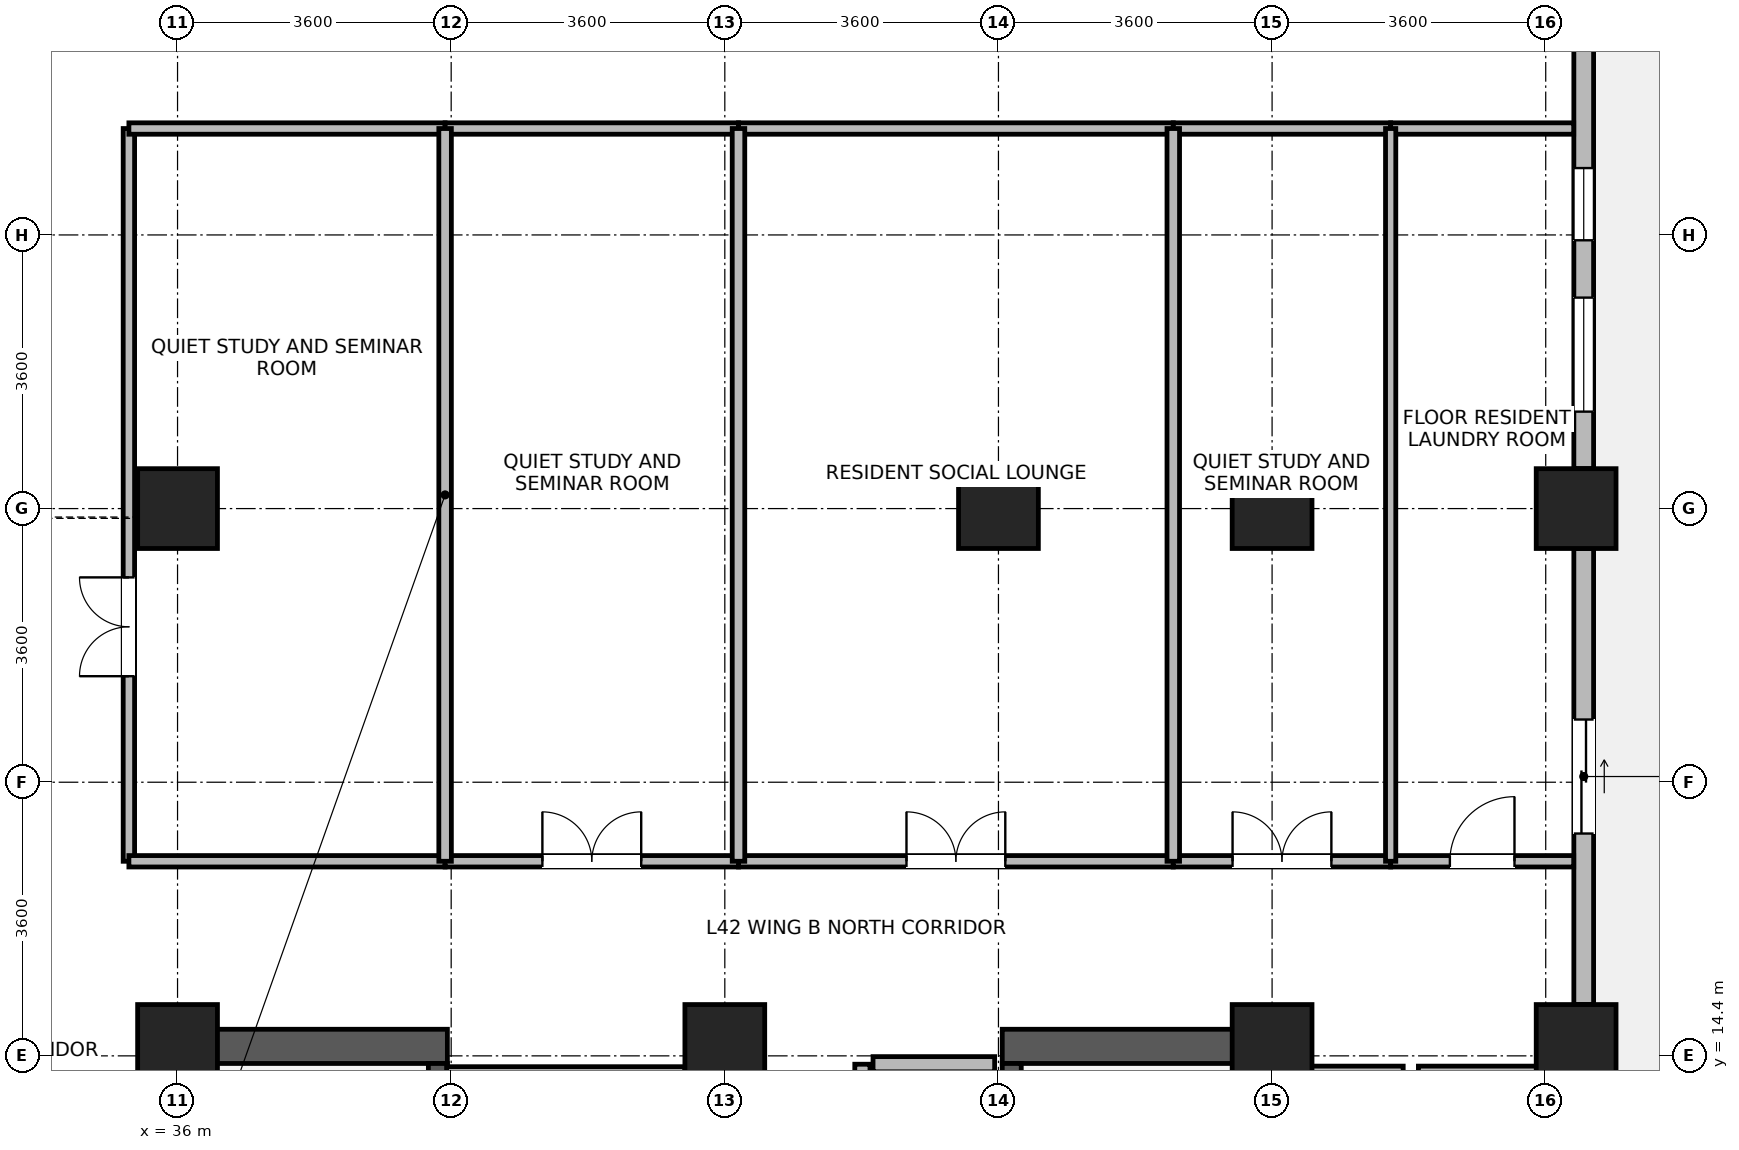
"""IFC4 building model, lengths in metres.
Left out: names, types, materials, properties, quantities, classifications, styles, units other than length and angle.
Written with IfcOpenShell. Run it as: python <this file> out.ifc"""

import sys

from ifc_helpers import new_model, si_unit, direction, frame, frame_2d, origin, origin_2d, place, context, subcontext, project, spatial, rectangle, extrude, source, transform, mapped, element, fill, save


model = new_model("IFC4")
c1 = context("Model", 3, precision=1e-05, world=origin(), true_north=direction((0.0, 1.0)))
c2 = subcontext(c1, "Body", "Model", "MODEL_VIEW")
j1 = project(units=[si_unit("LENGTHUNIT", "METRE"), si_unit("PLANEANGLEUNIT", "RADIAN")], contexts=[c1])
p1 = place(None, origin())
s1 = spatial("IfcSite", under=j1, at=p1, CompositionType="ELEMENT")
p2 = place(p1, origin())
s2 = spatial("IfcBuilding", under=s1, at=p2, CompositionType="ELEMENT")
p3 = place(p2, frame((0.0, 0.0, 166.1)))
s3 = spatial("IfcBuildingStorey", under=s2, at=p3, CompositionType="ELEMENT", Elevation=166.1)
for number, where, z_axis, x_axis in (
    (1, (36.125, 6.85, 0.0), (0.0, 0.0, 1.0), (0.0, 1.0, 0.0)),
    (2, (50.275, 6.85, 0.0), (0.0, 0.0, 1.0), (0.0, 1.0, 0.0)),
):
    element("IfcWall", number, at=place(p3, frame(where, z_axis=z_axis, x_axis=x_axis)), inside=s3, PredefinedType="SHEAR", context=c2, shape_type="SweptSolid", body=[
        extrude(rectangle(XDim=7.9, YDim=0.45, at=frame_2d((3.95, 0.0))), origin(), (0.0, 0.0, 1.0), 3.46),
    ])
for number, where, z_axis, x_axis in (
    (3, (36.35, 14.525, 0.0), (0.0, 0.0, 1.0), (1.0, 0.0, 0.0)),
    (4, (46.85, 14.525, 0.0), (0.0, 0.0, 1.0), (1.0, 0.0, 0.0)),
):
    element("IfcWall", number, at=place(p3, frame(where, z_axis=z_axis, x_axis=x_axis)), inside=s3, PredefinedType="SHEAR", context=c2, shape_type="SweptSolid", body=[
        extrude(rectangle(XDim=3.2, YDim=0.45, at=frame_2d((1.6, 0.0))), origin(), (0.0, 0.0, 1.0), 3.46),
    ])
p4 = place(p3, frame((39.425, 7.3, 0.0), z_axis=(0.0, 0.0, 1.0), x_axis=(0.0, 1.0, 0.0)))
e5 = element("IfcWall", 5, at=p4, inside=s3, PredefinedType="SHEAR", context=c2, shape_type="SweptSolid", body=[
    extrude(rectangle(XDim=7.0, YDim=0.25, at=frame_2d((3.5, 0.0))), origin(), (0.0, 0.0, 1.0), 3.46),
])
p5 = place(p4, frame((0.15, 0.0, 0.0)))
e6 = element("IfcOpeningElement", 6, at=p5, cuts=e5, PredefinedType="OPENING", context=c2, shape_type="SweptSolid", body=[
    extrude(rectangle(XDim=1.1, YDim=2.08, at=frame_2d((0.55, 1.04))), frame((0.0, 0.135, 0.0), z_axis=(0.0, -1.0, 0.0), x_axis=(1.0, 0.0, 0.0)), (0.0, 0.0, 1.0), 0.27),
])
p6 = place(p3, frame((46.975, 7.3, 0.0), z_axis=(0.0, 0.0, 1.0), x_axis=(0.0, 1.0, 0.0)))
e7 = element("IfcWall", 7, at=p6, inside=s3, PredefinedType="SHEAR", context=c2, shape_type="SweptSolid", body=[
    extrude(rectangle(XDim=7.0, YDim=0.25, at=frame_2d((3.5, 0.0))), origin(), (0.0, 0.0, 1.0), 3.46),
])
p7 = place(p6, frame((0.15, 0.0, 0.0)))
e8 = element("IfcOpeningElement", 8, at=p7, cuts=e7, PredefinedType="OPENING", context=c2, shape_type="SweptSolid", body=[
    extrude(rectangle(XDim=1.1, YDim=2.08, at=frame_2d((0.55, 1.04))), frame((0.0, 0.135, 0.0), z_axis=(0.0, -1.0, 0.0), x_axis=(1.0, 0.0, 0.0)), (0.0, 0.0, 1.0), 0.27),
])
m1 = source(origin(), c2, "Body", "SweptSolid", [
    extrude(rectangle(XDim=1.05, YDim=1.05, at=origin_2d()), origin(), (0.0, 0.0, 1.0), 3.7),
])
for number, where, z_axis, x_axis in (
    (9, (36.0, 21.6, 0.0), (0.0, 0.0, 1.0), (1.0, 0.0, 0.0)),
    (10, (46.8, 21.6, 0.0), (0.0, 0.0, 1.0), (1.0, 0.0, 0.0)),
    (11, (36.0, 14.55, 0.0), (0.0, 0.0, 1.0), (1.0, 0.0, 0.0)),
    (12, (43.2, 14.55, 0.0), (0.0, 0.0, 1.0), (1.0, 0.0, 0.0)),
    (13, (50.4, 14.55, 0.0), (0.0, 0.0, 1.0), (1.0, 0.0, 0.0)),
    (14, (50.4, 21.6, 0.0), (0.0, 0.0, 1.0), (1.0, 0.0, 0.0)),
    (15, (54.4, 14.55, 0.0), (0.0, 0.0, 1.0), (1.0, 0.0, 0.0)),
    (16, (54.4, 21.6, 0.0), (0.0, 0.0, 1.0), (1.0, 0.0, 0.0)),
):
    element("IfcColumn", number, at=place(p3, frame(where, z_axis=z_axis, x_axis=x_axis)), inside=s3, PredefinedType="COLUMN", context=c2, shape_type="MappedRepresentation", body=[
        mapped(m1, transform((0.0, 0.0, 0.0), x_axis=(1.0, 0.0, 0.0), y_axis=(0.0, 1.0, 0.0), z_axis=(0.0, 0.0, 1.0), scale=1.0)),
    ])
p8 = place(p3, frame((54.5, 21.074, 0.0), z_axis=(0.0, 0.0, 1.0), x_axis=(0.0, -1.0, 0.0)))
e17 = element("IfcWall", 17, at=p8, inside=s3, PredefinedType="STANDARD", context=c2, shape_type="SweptSolid", body=[
    extrude(rectangle(XDim=5.998, YDim=0.26, at=frame_2d((2.999, 0.0))), origin(), (0.0, 0.0, 1.0), 2.99),
])
p9 = place(p8, frame((2.249, 0.0, 0.0)))
e18 = element("IfcOpeningElement", 18, at=p9, cuts=e17, PredefinedType="OPENING", context=c2, shape_type="SweptSolid", body=[
    extrude(rectangle(XDim=1.5, YDim=2.15, at=frame_2d((0.75, 1.075))), frame((0.0, 0.14, 0.0), z_axis=(0.0, -1.0, 0.0), x_axis=(1.0, 0.0, 0.0)), (0.0, 0.0, 1.0), 0.28),
])
p10 = place(p3, frame((54.5, 28.124, 0.0), z_axis=(0.0, 0.0, 1.0), x_axis=(0.0, -1.0, 0.0)))
e19 = element("IfcWall", 19, at=p10, inside=s3, PredefinedType="STANDARD", context=c2, shape_type="SweptSolid", body=[
    extrude(rectangle(XDim=5.998, YDim=0.26, at=frame_2d((2.999, 0.0))), origin(), (0.0, 0.0, 1.0), 2.99),
])
p11 = place(p10, frame((3.749, 0.0, 0.85)))
e20 = element("IfcOpeningElement", 20, at=p11, cuts=e19, PredefinedType="OPENING", context=c2, shape_type="SweptSolid", body=[
    extrude(rectangle(XDim=1.5, YDim=1.85, at=frame_2d((0.75, 0.925))), frame((0.0, 0.14, 0.0), z_axis=(0.0, -1.0, 0.0), x_axis=(1.0, 0.0, 0.0)), (0.0, 0.0, 1.0), 0.28),
])
p12 = place(p10, frame((2.044, 0.0, 0.85)))
e21 = element("IfcOpeningElement", 21, at=p12, cuts=e19, PredefinedType="OPENING", context=c2, shape_type="SweptSolid", body=[
    extrude(rectangle(XDim=0.95, YDim=1.75, at=frame_2d((0.475, 0.875))), frame((0.0, 0.14, 0.0), z_axis=(0.0, -1.0, 0.0), x_axis=(1.0, 0.0, 0.0)), (0.0, 0.0, 1.0), 0.28),
])
p13 = place(p3, frame((50.475, 14.165, 0.0), z_axis=(0.0, 0.0, 1.0), x_axis=(1.0, 0.0, 0.0)))
e22 = element("IfcWall", 22, at=p13, inside=s3, PredefinedType="PARTITIONING", context=c2, shape_type="SweptSolid", body=[
    extrude(rectangle(XDim=1.65, YDim=0.2, at=frame_2d((0.825, 0.0))), origin(), (0.0, 0.0, 1.0), 3.44),
])
p14 = place(p3, frame((52.325, 14.165, 0.0), z_axis=(0.0, 0.0, 1.0), x_axis=(1.0, 0.0, 0.0)))
e23 = element("IfcWall", 23, at=p14, inside=s3, PredefinedType="PARTITIONING", context=c2, shape_type="SweptSolid", body=[
    extrude(rectangle(XDim=1.65, YDim=0.2, at=frame_2d((0.825, 0.0))), origin(), (0.0, 0.0, 1.0), 3.44),
])
p15 = place(p3, frame((45.15, 14.29, 0.0), z_axis=(0.0, 0.0, 1.0), x_axis=(1.0, 0.0, 0.0)))
e24 = element("IfcWall", 24, at=p15, inside=s3, PredefinedType="PARTITIONING", context=c2, shape_type="SweptSolid", body=[
    extrude(rectangle(XDim=1.6, YDim=0.2, at=frame_2d((0.8, 0.0))), origin(), (0.0, 0.0, 1.0), 2.44),
])
p16 = place(p3, frame((45.01, 11.61, 0.0), z_axis=(0.0, 0.0, 1.0), x_axis=(0.0, 1.0, 0.0)))
e25 = element("IfcWall", 25, at=p16, inside=s3, PredefinedType="PARTITIONING", context=c2, shape_type="SweptSolid", body=[
    extrude(rectangle(XDim=2.68, YDim=0.2, at=frame_2d((1.34, 0.0))), origin(), (0.0, 0.0, 1.0), 3.44),
])
p17 = place(p3, frame((35.36, 16.96, 0.0), z_axis=(0.0, 0.0, 1.0), x_axis=(0.0, 1.0, 0.0)))
e26 = element("IfcWall", 26, at=p17, inside=s3, PredefinedType="PARTITIONING", context=c2, shape_type="SweptSolid", body=[
    extrude(rectangle(XDim=9.64, YDim=0.15, at=frame_2d((4.82, 0.0))), origin(), (0.0, 0.0, 1.0), 3.44),
])
p18 = place(p17, frame((2.435, 0.0, 0.0)))
e27 = element("IfcOpeningElement", 27, at=p18, cuts=e26, PredefinedType="OPENING", context=c2, shape_type="SweptSolid", body=[
    extrude(rectangle(XDim=1.3, YDim=2.12, at=frame_2d((0.65, 1.06))), frame((0.0, 0.085, 0.0), z_axis=(0.0, -1.0, 0.0), x_axis=(1.0, 0.0, 0.0)), (0.0, 0.0, 1.0), 0.17),
])
p19 = place(p3, frame((43.38, 16.96, 0.0), z_axis=(0.0, 0.0, 1.0), x_axis=(1.0, 0.0, 0.0)))
e28 = element("IfcWall", 28, at=p19, inside=s3, PredefinedType="PARTITIONING", context=c2, shape_type="SweptSolid", body=[
    extrude(rectangle(XDim=5.72, YDim=0.15, at=frame_2d((2.86, 0.0))), origin(), (0.0, 0.0, 1.0), 3.44),
])
p20 = place(p19, frame((2.21, 0.0, 0.0)))
e29 = element("IfcOpeningElement", 29, at=p20, cuts=e28, PredefinedType="OPENING", context=c2, shape_type="SweptSolid", body=[
    extrude(rectangle(XDim=1.3, YDim=2.12, at=frame_2d((0.65, 1.06))), frame((0.0, 0.085, 0.0), z_axis=(0.0, -1.0, 0.0), x_axis=(1.0, 0.0, 0.0)), (0.0, 0.0, 1.0), 0.17),
])
p21 = place(p3, frame((43.38, 26.6, 0.0), z_axis=(0.0, 0.0, 1.0), x_axis=(1.0, 0.0, 0.0)))
e30 = element("IfcWall", 30, at=p21, inside=s3, PredefinedType="PARTITIONING", context=c2, shape_type="SweptSolid", body=[
    extrude(rectangle(XDim=5.72, YDim=0.15, at=frame_2d((2.86, 0.0))), origin(), (0.0, 0.0, 1.0), 3.44),
])
for number, where, z_axis, x_axis in (
    (31, (35.36, 16.96, 0.0), (0.0, 0.0, 1.0), (1.0, 0.0, 0.0)),
    (32, (35.36, 26.6, 0.0), (0.0, 0.0, 1.0), (1.0, 0.0, 0.0)),
):
    element("IfcWall", number, at=place(p3, frame(where, z_axis=z_axis, x_axis=x_axis)), inside=s3, PredefinedType="PARTITIONING", context=c2, shape_type="SweptSolid", body=[
        extrude(rectangle(XDim=4.16, YDim=0.15, at=frame_2d((2.08, 0.0))), origin(), (0.0, 0.0, 1.0), 3.44),
    ])
p22 = place(p3, frame((39.52, 16.96, 0.0), z_axis=(0.0, 0.0, 1.0), x_axis=(1.0, 0.0, 0.0)))
e33 = element("IfcWall", 33, at=p22, inside=s3, PredefinedType="PARTITIONING", context=c2, shape_type="SweptSolid", body=[
    extrude(rectangle(XDim=3.86, YDim=0.15, at=frame_2d((1.93, 0.0))), origin(), (0.0, 0.0, 1.0), 3.44),
])
p23 = place(p22, frame((1.28, 0.0, 0.0)))
e34 = element("IfcOpeningElement", 34, at=p23, cuts=e33, PredefinedType="OPENING", context=c2, shape_type="SweptSolid", body=[
    extrude(rectangle(XDim=1.3, YDim=2.12, at=frame_2d((0.65, 1.06))), frame((0.0, 0.085, 0.0), z_axis=(0.0, -1.0, 0.0), x_axis=(1.0, 0.0, 0.0)), (0.0, 0.0, 1.0), 0.17),
])
p24 = place(p3, frame((39.52, 26.6, 0.0), z_axis=(0.0, 0.0, 1.0), x_axis=(1.0, 0.0, 0.0)))
e35 = element("IfcWall", 35, at=p24, inside=s3, PredefinedType="PARTITIONING", context=c2, shape_type="SweptSolid", body=[
    extrude(rectangle(XDim=3.86, YDim=0.15, at=frame_2d((1.93, 0.0))), origin(), (0.0, 0.0, 1.0), 3.44),
])
p25 = place(p3, frame((49.1, 16.96, 0.0), z_axis=(0.0, 0.0, 1.0), x_axis=(1.0, 0.0, 0.0)))
e36 = element("IfcWall", 36, at=p25, inside=s3, PredefinedType="PARTITIONING", context=c2, shape_type="SweptSolid", body=[
    extrude(rectangle(XDim=2.86, YDim=0.15, at=frame_2d((1.43, 0.0))), origin(), (0.0, 0.0, 1.0), 3.44),
])
p26 = place(p25, frame((0.78, 0.0, 0.0)))
e37 = element("IfcOpeningElement", 37, at=p26, cuts=e36, PredefinedType="OPENING", context=c2, shape_type="SweptSolid", body=[
    extrude(rectangle(XDim=1.3, YDim=2.12, at=frame_2d((0.65, 1.06))), frame((0.0, 0.085, 0.0), z_axis=(0.0, -1.0, 0.0), x_axis=(1.0, 0.0, 0.0)), (0.0, 0.0, 1.0), 0.17),
])
p27 = place(p3, frame((49.1, 26.6, 0.0), z_axis=(0.0, 0.0, 1.0), x_axis=(1.0, 0.0, 0.0)))
e38 = element("IfcWall", 38, at=p27, inside=s3, PredefinedType="PARTITIONING", context=c2, shape_type="SweptSolid", body=[
    extrude(rectangle(XDim=2.86, YDim=0.15, at=frame_2d((1.43, 0.0))), origin(), (0.0, 0.0, 1.0), 3.44),
])
p28 = place(p3, frame((51.96, 16.96, 0.0), z_axis=(0.0, 0.0, 1.0), x_axis=(1.0, 0.0, 0.0)))
e39 = element("IfcWall", 39, at=p28, inside=s3, PredefinedType="PARTITIONING", context=c2, shape_type="SweptSolid", body=[
    extrude(rectangle(XDim=2.408, YDim=0.15, at=frame_2d((1.204, 0.0))), origin(), (0.0, 0.0, 1.0), 3.44),
])
p29 = place(p28, frame((0.779, 0.0, 0.0)))
e40 = element("IfcOpeningElement", 40, at=p29, cuts=e39, PredefinedType="OPENING", context=c2, shape_type="SweptSolid", body=[
    extrude(rectangle(XDim=0.85, YDim=2.04, at=frame_2d((0.425, 1.02))), frame((0.0, 0.085, 0.0), z_axis=(0.0, -1.0, 0.0), x_axis=(1.0, 0.0, 0.0)), (0.0, 0.0, 1.0), 0.17),
])
p30 = place(p3, frame((51.96, 26.6, 0.0), z_axis=(0.0, 0.0, 1.0), x_axis=(1.0, 0.0, 0.0)))
e41 = element("IfcWall", 41, at=p30, inside=s3, PredefinedType="PARTITIONING", context=c2, shape_type="SweptSolid", body=[
    extrude(rectangle(XDim=2.408, YDim=0.15, at=frame_2d((1.204, 0.0))), origin(), (0.0, 0.0, 1.0), 3.44),
])
for number, where, z_axis, x_axis in (
    (42, (39.52, 16.96, 0.0), (0.0, 0.0, 1.0), (0.0, 1.0, 0.0)),
    (43, (43.38, 16.96, 0.0), (0.0, 0.0, 1.0), (0.0, 1.0, 0.0)),
    (44, (49.1, 16.96, 0.0), (0.0, 0.0, 1.0), (0.0, 1.0, 0.0)),
):
    element("IfcWall", number, at=place(p3, frame(where, z_axis=z_axis, x_axis=x_axis)), inside=s3, PredefinedType="PARTITIONING", context=c2, shape_type="SweptSolid", body=[
        extrude(rectangle(XDim=9.64, YDim=0.165, at=frame_2d((4.82, 0.0))), origin(), (0.0, 0.0, 1.0), 3.44),
    ])
p31 = place(p3, frame((51.96, 16.96, 0.0), z_axis=(0.0, 0.0, 1.0), x_axis=(0.0, 1.0, 0.0)))
e45 = element("IfcWall", 45, at=p31, inside=s3, PredefinedType="PARTITIONING", context=c2, shape_type="SweptSolid", body=[
    extrude(rectangle(XDim=9.64, YDim=0.135, at=frame_2d((4.82, 0.0))), origin(), (0.0, 0.0, 1.0), 3.44),
])
p32 = place(p3, frame((39.54, 14.2, 0.0), z_axis=(0.0, 0.0, 1.0), x_axis=(1.0, 0.0, 0.0)))
e46 = element("IfcWall", 46, at=p32, inside=s3, PredefinedType="PARTITIONING", context=c2, shape_type="SweptSolid", body=[
    extrude(rectangle(XDim=3.135, YDim=0.115, at=frame_2d((1.567, 0.0))), origin(), (0.0, 0.0, 1.0), 2.44),
])
p33 = place(p9, origin())
e47 = element("IfcDoor", 47, at=p33, inside=s3, OperationType="SLIDING_TO_LEFT", PredefinedType="DOOR", context=c2, shape_type="SweptSolid", body=[
    extrude(rectangle(XDim=1.5, YDim=2.15, at=frame_2d((0.75, 1.075))), frame((0.0, 0.025, 0.0), z_axis=(0.0, -1.0, 0.0), x_axis=(1.0, 0.0, 0.0)), (0.0, 0.0, 1.0), 0.05),
])
fill(e18, e47)
p34 = place(p11, origin())
e48 = element("IfcWindow", 48, at=p34, inside=s3, PartitioningType="SINGLE_PANEL", PredefinedType="WINDOW", context=c2, shape_type="SweptSolid", body=[
    extrude(rectangle(XDim=1.5, YDim=1.85, at=frame_2d((0.75, 0.925))), frame((0.0, 0.03, 0.0), z_axis=(0.0, -1.0, 0.0), x_axis=(1.0, 0.0, 0.0)), (0.0, 0.0, 1.0), 0.06),
])
fill(e20, e48)
p35 = place(p12, origin())
e49 = element("IfcWindow", 49, at=p35, inside=s3, PartitioningType="SINGLE_PANEL", PredefinedType="WINDOW", context=c2, shape_type="SweptSolid", body=[
    extrude(rectangle(XDim=0.95, YDim=1.75, at=frame_2d((0.475, 0.875))), frame((0.0, 0.03, 0.0), z_axis=(0.0, -1.0, 0.0), x_axis=(1.0, 0.0, 0.0)), (0.0, 0.0, 1.0), 0.06),
])
fill(e21, e49)
p36 = place(p18, origin())
e50 = element("IfcDoor", 50, at=p36, inside=s3, OperationType="DOUBLE_DOOR_SINGLE_SWING", PredefinedType="DOOR", context=c2, shape_type="SweptSolid", body=[
    extrude(rectangle(XDim=1.3, YDim=2.12, at=frame_2d((0.65, 1.06))), frame((0.0, 0.025, 0.0), z_axis=(0.0, -1.0, 0.0), x_axis=(1.0, 0.0, 0.0)), (0.0, 0.0, 1.0), 0.05),
])
fill(e27, e50)
p37 = place(p20, origin())
e51 = element("IfcDoor", 51, at=p37, inside=s3, OperationType="DOUBLE_DOOR_SINGLE_SWING", PredefinedType="DOOR", context=c2, shape_type="SweptSolid", body=[
    extrude(rectangle(XDim=1.3, YDim=2.12, at=frame_2d((0.65, 1.06))), frame((0.0, 0.025, 0.0), z_axis=(0.0, -1.0, 0.0), x_axis=(1.0, 0.0, 0.0)), (0.0, 0.0, 1.0), 0.05),
])
fill(e29, e51)
p38 = place(p23, origin())
e52 = element("IfcDoor", 52, at=p38, inside=s3, OperationType="DOUBLE_DOOR_SINGLE_SWING", PredefinedType="DOOR", context=c2, shape_type="SweptSolid", body=[
    extrude(rectangle(XDim=1.3, YDim=2.12, at=frame_2d((0.65, 1.06))), frame((0.0, 0.025, 0.0), z_axis=(0.0, -1.0, 0.0), x_axis=(1.0, 0.0, 0.0)), (0.0, 0.0, 1.0), 0.05),
])
fill(e34, e52)
p39 = place(p26, origin())
e53 = element("IfcDoor", 53, at=p39, inside=s3, OperationType="DOUBLE_DOOR_SINGLE_SWING", PredefinedType="DOOR", context=c2, shape_type="SweptSolid", body=[
    extrude(rectangle(XDim=1.3, YDim=2.12, at=frame_2d((0.65, 1.06))), frame((0.0, 0.025, 0.0), z_axis=(0.0, -1.0, 0.0), x_axis=(1.0, 0.0, 0.0)), (0.0, 0.0, 1.0), 0.05),
])
fill(e37, e53)
p40 = place(p29, origin())
e54 = element("IfcDoor", 54, at=p40, inside=s3, OperationType="SINGLE_SWING_RIGHT", PredefinedType="DOOR", context=c2, shape_type="SweptSolid", body=[
    extrude(rectangle(XDim=0.85, YDim=2.04, at=frame_2d((0.425, 1.02))), frame((0.0, 0.025, 0.0), z_axis=(0.0, -1.0, 0.0), x_axis=(1.0, 0.0, 0.0)), (0.0, 0.0, 1.0), 0.05),
])
fill(e40, e54)
save(model, sys.argv[1])
